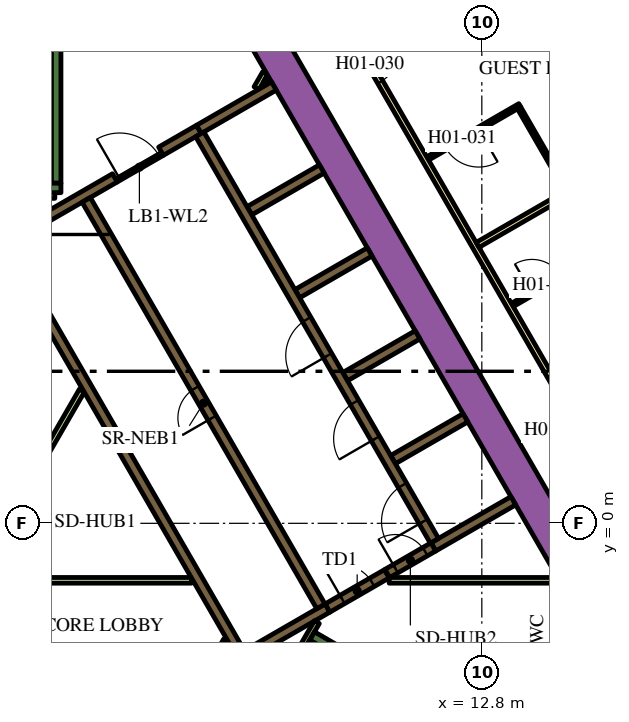
"""IFC4 building model, lengths in metres.
Left out: names, types, materials, properties, quantities, classifications, styles, units other than length and angle.
Written with IfcOpenShell. Run it as: python <this file> out.ifc"""

import sys

from ifc_helpers import new_model, si_unit, direction, frame, frame_2d, origin, place, context, subcontext, project, spatial, polyline, rectangle, outline, extrude, element, fill, save


model = new_model("IFC4")
c1 = context("Model", 3, precision=1e-05, world=origin(), true_north=direction((0.0, 1.0)))
c2 = subcontext(c1, "Body", "Model", "MODEL_VIEW")
j1 = project(units=[si_unit("LENGTHUNIT", "METRE"), si_unit("PLANEANGLEUNIT", "RADIAN")], contexts=[c1])
p1 = place(None, origin())
s1 = spatial("IfcSite", under=j1, at=p1, CompositionType="ELEMENT")
p2 = place(p1, origin())
s2 = spatial("IfcBuilding", under=s1, at=p2, CompositionType="ELEMENT")
p3 = place(p2, frame((0.0, 0.0, 27.6)))
s3 = spatial("IfcBuildingStorey", under=s2, at=p3, CompositionType="ELEMENT", Elevation=27.6)
p4 = place(p3, frame((6.776, 13.364, 0.0), z_axis=(0.0, 0.0, 1.0), x_axis=(0.500004177138, -0.8660229921, 0.0)))
e1 = element("IfcWall", 1, at=p4, inside=s3, PredefinedType="SOLIDWALL", context=c2, shape_type="SweptSolid", body=[
    extrude(rectangle(XDim=20.204, YDim=0.9, at=frame_2d((10.102, 0.0))), origin(), (0.0, 0.0, 1.0), 3.9),
])
p5 = place(p3, frame((8.334, -2.964, 0.0), z_axis=(0.0, 0.0, 1.0), x_axis=(0.866016039709, -0.500016218704, 0.0)))
e2 = element("IfcWall", 2, at=p5, inside=s3, PredefinedType="SOLIDWALL", context=c2, shape_type="SweptSolid", body=[
    extrude(rectangle(XDim=7.05, YDim=0.25, at=frame_2d((3.525, 0.0))), origin(), (0.0, 0.0, 1.0), 3.9),
])
p6 = place(p3, frame((8.168, -3.503, 0.0), z_axis=(0.0, 0.0, 1.0), x_axis=(0.49972245349, 0.866185586049, 0.0)))
e3 = element("IfcWall", 3, at=p6, inside=s3, PredefinedType="SOLIDWALL", context=c2, shape_type="SweptSolid", body=[
    extrude(rectangle(XDim=0.425, YDim=0.25, at=frame_2d((0.212, 0.0))), origin(), (0.0, 0.0, 1.0), 3.9),
])
p7 = place(p3, frame((1.6, 8.95, 0.0), z_axis=(0.0, 0.0, 1.0), x_axis=(0.0, 1.0, 0.0)))
e4 = element("IfcWall", 4, at=p7, inside=s3, PredefinedType="SOLIDWALL", context=c2, shape_type="SweptSolid", body=[
    extrude(rectangle(XDim=6.8, YDim=0.25, at=frame_2d((3.4, 0.0))), origin(), (0.0, 0.0, 1.0), 3.9),
])
p8 = place(p3, frame((1.05, 8.825, 0.0), z_axis=(0.0, 0.0, 1.0), x_axis=(1.0, 0.0, 0.0)))
e5 = element("IfcWall", 5, at=p8, inside=s3, PredefinedType="SOLIDWALL", context=c2, shape_type="SweptSolid", body=[
    extrude(rectangle(XDim=0.675, YDim=0.25, at=frame_2d((0.337, 0.0))), origin(), (0.0, 0.0, 1.0), 3.9),
])
p9 = place(p3, frame((10.464, 1.677, 0.0), z_axis=(0.0, 0.0, 1.0), x_axis=(0.86605622881, 0.499946605688, 0.0)))
e6 = element("IfcWall", 6, at=p9, inside=s3, PredefinedType="SOLIDWALL", context=c2, shape_type="SweptSolid", body=[
    extrude(rectangle(XDim=2.2, YDim=0.25, at=frame_2d((1.1, 0.0))), origin(), (0.0, 0.0, 1.0), 3.9),
])
p10 = place(p3, frame((13.629, 0.594, 0.0), z_axis=(0.0, 0.0, 1.0), x_axis=(-0.866063384774, -0.499934209226, 0.0)))
e7 = element("IfcWall", 7, at=p10, inside=s3, PredefinedType="SOLIDWALL", context=c2, shape_type="SweptSolid", body=[
    extrude(rectangle(XDim=2.428, YDim=0.25, at=frame_2d((1.214, 0.0))), origin(), (0.0, 0.0, 1.0), 3.9),
])
p11 = place(p3, origin())
e8 = element("IfcWall", 8, at=p11, inside=s3, PredefinedType="SOLIDWALL", context=c2, shape_type="SweptSolid", body=[
    extrude(outline(polyline([(0.566, 6.725), (0.566, 6.875), (0.566, 6.875), (0.565, 6.875), (0.361, 6.875), (0.035, 7.439), (0.252, 7.564), (0.377, 7.348), (6.552, -3.348), (6.677, -3.564), (6.46, -3.689), (0.448, 6.725), (0.565, 6.725), (0.566, 6.725), (0.566, 6.725)])), origin(), (0.0, 0.0, 1.0), 3.9),
])
p12 = place(p3, frame((4.358, 9.791, 0.0), z_axis=(0.0, 0.0, 1.0), x_axis=(0.866079547155, 0.499906209203, 0.0)))
e9 = element("IfcWall", 9, at=p12, inside=s3, PredefinedType="SOLIDWALL", context=c2, shape_type="SweptSolid", body=[
    extrude(rectangle(XDim=1.15, YDim=0.25, at=frame_2d((0.575, 0.0))), origin(), (0.0, 0.0, 1.0), 3.9),
])
p13 = place(p3, frame((5.356, 10.367, 0.0), z_axis=(0.0, 0.0, 1.0), x_axis=(0.865978535641, 0.50008116922, 0.0)))
e10 = element("IfcWall", 10, at=p13, inside=s3, PredefinedType="SOLIDWALL", context=c2, shape_type="SweptSolid", body=[
    extrude(rectangle(XDim=2.278, YDim=0.25, at=frame_2d((1.139, 0.0))), origin(), (0.0, 0.0, 1.0), 3.9),
])
p14 = place(p3, frame((0.314, 7.456, 0.0), z_axis=(0.0, 0.0, 1.0), x_axis=(0.866013897511, 0.50001992892, 0.0)))
e11 = element("IfcWall", 11, at=p14, inside=s3, PredefinedType="SOLIDWALL", context=c2, shape_type="SweptSolid", body=[
    extrude(rectangle(XDim=3.268, YDim=0.25, at=frame_2d((1.634, 0.0))), origin(), (0.0, 0.0, 1.0), 3.9),
])
p15 = place(p3, frame((6.614, -3.456, 0.0), z_axis=(0.0, 0.0, 1.0), x_axis=(0.866031582473, 0.499989298045, 0.0)))
e12 = element("IfcWall", 12, at=p15, inside=s3, PredefinedType="SOLIDWALL", context=c2, shape_type="SweptSolid", body=[
    extrude(rectangle(XDim=2.455, YDim=0.25, at=frame_2d((1.228, 0.0))), origin(), (0.0, 0.0, 1.0), 3.9),
])
for number, where, z_axis, x_axis in (
    (13, (6.684, 8.224, 0.0), (0.0, 0.0, 1.0), (0.866, 0.5, 0.0)),
    (14, (7.944, 6.041, 0.0), (0.0, 0.0, 1.0), (0.866, 0.5, 0.0)),
    (15, (9.204, 3.859, 0.0), (0.0, 0.0, 1.0), (0.866, 0.5, 0.0)),
):
    element("IfcWall", number, at=place(p3, frame(where, z_axis=z_axis, x_axis=x_axis)), inside=s3, PredefinedType="SOLIDWALL", context=c2, shape_type="SweptSolid", body=[
        extrude(rectangle(XDim=2.2, YDim=0.25, at=frame_2d((1.1, 0.0))), origin(), (0.0, 0.0, 1.0), 3.9),
    ])
p16 = place(p3, frame((5.705, -3.718, 0.0), z_axis=(0.0, 0.0, 1.0), x_axis=(0.499962090823, 0.866047289552, 0.0)))
e16 = element("IfcWall", 16, at=p16, inside=s3, PredefinedType="PARTITIONING", context=c2, shape_type="SweptSolid", body=[
    extrude(rectangle(XDim=0.735, YDim=0.15, at=frame_2d((0.367, 0.0))), origin(), (0.0, 0.0, 1.0), 2.75),
])
p17 = place(p3, frame((8.459, -2.599, 0.0), z_axis=(0.0, 0.0, 1.0), x_axis=(-0.500041054325, -0.866001699761, 0.0)))
e17 = element("IfcWall", 17, at=p17, inside=s3, PredefinedType="PARTITIONING", context=c2, shape_type="SweptSolid", body=[
    extrude(rectangle(XDim=0.929, YDim=0.15, at=frame_2d((0.464, 0.0))), origin(), (0.0, 0.0, 1.0), 3.9),
])
p18 = place(p3, frame((10.362, -1.5, 0.0), z_axis=(0.0, 0.0, 1.0), x_axis=(1.0, 0.0, 0.0)))
e18 = element("IfcWall", 18, at=p18, inside=s3, PredefinedType="PARTITIONING", context=c2, shape_type="SweptSolid", body=[
    extrude(rectangle(XDim=4.439, YDim=0.15, at=frame_2d((2.22, 0.0))), origin(), (0.0, 0.0, 1.0), 2.75),
])
p19 = place(p3, frame((-4.2, -1.5, 0.0), z_axis=(0.0, 0.0, 1.0), x_axis=(1.0, 0.0, 0.0)))
e19 = element("IfcWall", 19, at=p19, inside=s3, PredefinedType="PARTITIONING", context=c2, shape_type="SweptSolid", body=[
    extrude(rectangle(XDim=9.359, YDim=0.15, at=frame_2d((4.68, 0.0))), origin(), (0.0, 0.0, 1.0), 2.75),
])
p20 = place(p3, frame((1.312, 1.822, 0.0), z_axis=(0.0, 0.0, 1.0), x_axis=(0.500003549559, 0.866023354436, 0.0)))
e20 = element("IfcWall", 20, at=p20, inside=s3, PredefinedType="PARTITIONING", context=c2, shape_type="SweptSolid", body=[
    extrude(rectangle(XDim=1.93, YDim=0.15, at=frame_2d((0.965, 0.0))), origin(), (0.0, 0.0, 1.0), 2.75),
])
p21 = place(p3, frame((1.05, 8.625, 0.0), z_axis=(0.0, 0.0, 1.0), x_axis=(1.0, 0.0, 0.0)))
e21 = element("IfcWall", 21, at=p21, inside=s3, PredefinedType="PARTITIONING", context=c2, shape_type="SweptSolid", body=[
    extrude(rectangle(XDim=0.514, YDim=0.15, at=frame_2d((0.257, 0.0))), origin(), (0.0, 0.0, 1.0), 2.75),
])
p22 = place(p3, frame((6.872, 11.45, 0.0), z_axis=(0.0, 0.0, 1.0), x_axis=(0.499846793097, 0.866113839764, 0.0)))
e22 = element("IfcWall", 22, at=p22, inside=s3, PredefinedType="PARTITIONING", context=c2, shape_type="SweptSolid", body=[
    extrude(rectangle(XDim=0.453, YDim=0.15, at=frame_2d((0.227, 0.0))), origin(), (0.0, 0.0, 1.0), 2.75),
])
p23 = place(p3, frame((7.131, 11.6, 0.0), z_axis=(0.0, 0.0, 1.0), x_axis=(0.498600033135, 0.866832167699, 0.0)))
e23 = element("IfcWall", 23, at=p23, inside=s3, PredefinedType="PARTITIONING", context=c2, shape_type="SweptSolid", body=[
    extrude(rectangle(XDim=0.107, YDim=0.15, at=frame_2d((0.053, 0.0))), origin(), (0.0, 0.0, 1.0), 2.75),
])
p24 = place(p3, frame((11.553, -0.46, 0.0), z_axis=(0.0, 0.0, 1.0), x_axis=(-0.500006514828, 0.866021642414, 0.0)))
e24 = element("IfcWall", 24, at=p24, inside=s3, PredefinedType="SOLIDWALL", context=c2, shape_type="SweptSolid", body=[
    extrude(rectangle(XDim=12.35, YDim=0.25, at=frame_2d((6.175, 0.0))), origin(), (0.0, 0.0, 1.0), 3.9),
])
p25 = place(p24, frame((0.585, 0.0, 0.0)))
e25 = element("IfcOpeningElement", 25, at=p25, cuts=e24, PredefinedType="OPENING", context=c2, shape_type="SweptSolid", body=[
    extrude(rectangle(XDim=1.1, YDim=2.1, at=frame_2d((0.55, 1.05))), frame((0.0, 0.135, 0.0), z_axis=(0.0, -1.0, 0.0), x_axis=(1.0, 0.0, 0.0)), (0.0, 0.0, 1.0), 0.27),
])
p26 = place(p24, frame((3.105, 0.0, 0.0)))
e26 = element("IfcOpeningElement", 26, at=p26, cuts=e24, PredefinedType="OPENING", context=c2, shape_type="SweptSolid", body=[
    extrude(rectangle(XDim=1.1, YDim=2.1, at=frame_2d((0.55, 1.05))), frame((0.0, 0.135, 0.0), z_axis=(0.0, -1.0, 0.0), x_axis=(1.0, 0.0, 0.0)), (0.0, 0.0, 1.0), 0.27),
])
p27 = place(p24, frame((5.625, 0.0, 0.0)))
e27 = element("IfcOpeningElement", 27, at=p27, cuts=e24, PredefinedType="OPENING", context=c2, shape_type="SweptSolid", body=[
    extrude(rectangle(XDim=1.1, YDim=2.1, at=frame_2d((0.55, 1.05))), frame((0.0, 0.135, 0.0), z_axis=(0.0, -1.0, 0.0), x_axis=(1.0, 0.0, 0.0)), (0.0, 0.0, 1.0), 0.27),
])
p28 = place(p3, frame((8.565, -2.185, 0.0), z_axis=(0.0, 0.0, 1.0), x_axis=(-0.499997954832, 0.866026584559, 0.0)))
e28 = element("IfcWall", 28, at=p28, inside=s3, PredefinedType="SOLIDWALL", context=c2, shape_type="SweptSolid", body=[
    extrude(rectangle(XDim=12.35, YDim=0.25, at=frame_2d((6.175, 0.0))), origin(), (0.0, 0.0, 1.0), 3.9),
])
p29 = place(p28, frame((5.725, 0.0, 0.0)))
e29 = element("IfcOpeningElement", 29, at=p29, cuts=e28, PredefinedType="OPENING", context=c2, shape_type="SweptSolid", body=[
    extrude(rectangle(XDim=0.9, YDim=2.1, at=frame_2d((0.45, 1.05))), frame((0.0, 0.135, 0.0), z_axis=(0.0, -1.0, 0.0), x_axis=(1.0, 0.0, 0.0)), (0.0, 0.0, 1.0), 0.27),
])
p30 = place(p3, frame((8.74, -2.229, 0.0), z_axis=(0.0, 0.0, 1.0), x_axis=(0.865989075817, 0.500062916607, 0.0)))
e30 = element("IfcWall", 30, at=p30, inside=s3, PredefinedType="SOLIDWALL", context=c2, shape_type="SweptSolid", body=[
    extrude(rectangle(XDim=1.8, YDim=0.25, at=frame_2d((0.9, 0.0))), origin(), (0.0, 0.0, 1.0), 3.9),
])
p31 = place(p30, frame((0.45, 0.0, 0.0)))
e31 = element("IfcOpeningElement", 31, at=p31, cuts=e30, PredefinedType="OPENING", context=c2, shape_type="SweptSolid", body=[
    extrude(rectangle(XDim=0.9, YDim=2.1, at=frame_2d((0.45, 1.05))), frame((0.0, 0.135, 0.0), z_axis=(0.0, -1.0, 0.0), x_axis=(1.0, 0.0, 0.0)), (0.0, 0.0, 1.0), 0.27),
])
p32 = place(p3, frame((3.183, 9.02, 0.0), z_axis=(0.0, 0.0, 1.0), x_axis=(0.866034573852, 0.49998411664, 0.0)))
e32 = element("IfcWall", 32, at=p32, inside=s3, PredefinedType="PARTITIONING", context=c2, shape_type="SweptSolid", body=[
    extrude(rectangle(XDim=1.4, YDim=0.09, at=frame_2d((0.7, 0.0))), origin(), (0.0, 0.0, 1.0), 2.75),
])
p33 = place(p32, frame((0.1, 0.0, 0.0)))
e33 = element("IfcOpeningElement", 33, at=p33, cuts=e32, PredefinedType="OPENING", context=c2, shape_type="SweptSolid", body=[
    extrude(rectangle(XDim=1.2, YDim=2.1, at=frame_2d((0.6, 1.05))), frame((0.0, 0.055, 0.0), z_axis=(0.0, -1.0, 0.0), x_axis=(1.0, 0.0, 0.0)), (0.0, 0.0, 1.0), 0.11),
])
p34 = place(p3, frame((10.313, -1.32, 0.0), z_axis=(0.0, 0.0, 1.0), x_axis=(0.866034573852, 0.49998411664, 0.0)))
e34 = element("IfcWall", 34, at=p34, inside=s3, PredefinedType="SOLIDWALL", context=c2, shape_type="SweptSolid", body=[
    extrude(rectangle(XDim=1.4, YDim=0.25, at=frame_2d((0.7, 0.0))), origin(), (0.0, 0.0, 1.0), 3.9),
])
p35 = place(p34, frame((0.25, 0.0, 0.0)))
e35 = element("IfcOpeningElement", 35, at=p35, cuts=e34, PredefinedType="OPENING", context=c2, shape_type="SweptSolid", body=[
    extrude(rectangle(XDim=0.9, YDim=2.1, at=frame_2d((0.45, 1.05))), frame((0.0, 0.135, 0.0), z_axis=(0.0, -1.0, 0.0), x_axis=(1.0, 0.0, 0.0)), (0.0, 0.0, 1.0), 0.27),
])
p36 = place(p3, frame((6.163, 18.475, 0.0), z_axis=(0.0, 0.0, 1.0), x_axis=(0.500001317485, -0.866024643133, 0.0)))
e36 = element("IfcWall", 36, at=p36, inside=s3, PredefinedType="PARTITIONING", context=c2, shape_type="SweptSolid", body=[
    extrude(rectangle(XDim=25.767, YDim=0.15, at=frame_2d((12.883, 0.0))), origin(), (0.0, 0.0, 1.0), 2.75),
])
p37 = place(p36, frame((24.586, 0.0, 0.0)))
e37 = element("IfcOpeningElement", 37, at=p37, cuts=e36, PredefinedType="OPENING", context=c2, shape_type="SweptSolid", body=[
    extrude(rectangle(XDim=1.0, YDim=2.1, at=frame_2d((0.5, 1.05))), frame((0.0, 0.085, 0.0), z_axis=(0.0, -1.0, 0.0), x_axis=(1.0, 0.0, 0.0)), (0.0, 0.0, 1.0), 0.17),
])
p38 = place(p36, frame((19.319, 0.0, 0.0)))
e38 = element("IfcOpeningElement", 38, at=p38, cuts=e36, PredefinedType="OPENING", context=c2, shape_type="SweptSolid", body=[
    extrude(rectangle(XDim=1.0, YDim=2.1, at=frame_2d((0.5, 1.05))), frame((0.0, 0.085, 0.0), z_axis=(0.0, -1.0, 0.0), x_axis=(1.0, 0.0, 0.0)), (0.0, 0.0, 1.0), 0.17),
])
p39 = place(p36, frame((18.012, 0.0, 0.0)))
e39 = element("IfcOpeningElement", 39, at=p39, cuts=e36, PredefinedType="OPENING", context=c2, shape_type="SweptSolid", body=[
    extrude(rectangle(XDim=1.0, YDim=2.1, at=frame_2d((0.5, 1.05))), frame((0.0, 0.085, 0.0), z_axis=(0.0, -1.0, 0.0), x_axis=(1.0, 0.0, 0.0)), (0.0, 0.0, 1.0), 0.17),
])
p40 = place(p36, frame((6.824, 0.0, 0.0)))
e40 = element("IfcOpeningElement", 40, at=p40, cuts=e36, PredefinedType="OPENING", context=c2, shape_type="SweptSolid", body=[
    extrude(rectangle(XDim=1.1, YDim=2.1, at=frame_2d((0.55, 1.05))), frame((0.0, 0.085, 0.0), z_axis=(0.0, -1.0, 0.0), x_axis=(1.0, 0.0, 0.0)), (0.0, 0.0, 1.0), 0.17),
])
p41 = place(p36, frame((4.658, 0.0, 0.0)))
e41 = element("IfcOpeningElement", 41, at=p41, cuts=e36, PredefinedType="OPENING", context=c2, shape_type="SweptSolid", body=[
    extrude(rectangle(XDim=0.9, YDim=2.1, at=frame_2d((0.45, 1.05))), frame((0.0, 0.085, 0.0), z_axis=(0.0, -1.0, 0.0), x_axis=(1.0, 0.0, 0.0)), (0.0, 0.0, 1.0), 0.17),
])
p42 = place(p36, frame((0.18, 0.0, 0.0)))
e42 = element("IfcOpeningElement", 42, at=p42, cuts=e36, PredefinedType="OPENING", context=c2, shape_type="SweptSolid", body=[
    extrude(rectangle(XDim=1.0, YDim=2.1, at=frame_2d((0.5, 1.05))), frame((0.0, 0.085, 0.0), z_axis=(0.0, -1.0, 0.0), x_axis=(1.0, 0.0, 0.0)), (0.0, 0.0, 1.0), 0.17),
])
p43 = place(p3, frame((19.982, 11.537, 0.0), z_axis=(0.0, 0.0, 1.0), x_axis=(-0.866020994654, -0.500007636761, 0.0)))
e43 = element("IfcWall", 43, at=p43, inside=s3, PredefinedType="PARTITIONING", context=c2, shape_type="SweptSolid", body=[
    extrude(rectangle(XDim=8.423, YDim=0.15, at=frame_2d((4.211, 0.0))), origin(), (0.0, 0.0, 1.0), 2.75),
])
p44 = place(p3, frame((13.6, 5.744, 0.0), z_axis=(0.0, 0.0, 1.0), x_axis=(0.866021400173, 0.500006934395, 0.0)))
e44 = element("IfcWall", 44, at=p44, inside=s3, PredefinedType="PARTITIONING", context=c2, shape_type="SweptSolid", body=[
    extrude(rectangle(XDim=2.6, YDim=0.1, at=frame_2d((1.3, 0.0))), origin(), (0.0, 0.0, 1.0), 2.75),
])
p45 = place(p44, frame((0.6, 0.0, 0.0)))
e45 = element("IfcOpeningElement", 45, at=p45, cuts=e44, PredefinedType="OPENING", context=c2, shape_type="SweptSolid", body=[
    extrude(rectangle(XDim=0.9, YDim=2.1, at=frame_2d((0.45, 1.05))), frame((0.0, 0.06, 0.0), z_axis=(0.0, -1.0, 0.0), x_axis=(1.0, 0.0, 0.0)), (0.0, 0.0, 1.0), 0.12),
])
p46 = place(p3, frame((13.799, 10.999, 0.0), z_axis=(0.0, 0.0, 1.0), x_axis=(-0.866034573852, -0.49998411664, 0.0)))
e46 = element("IfcWall", 46, at=p46, inside=s3, PredefinedType="PARTITIONING", context=c2, shape_type="SweptSolid", body=[
    extrude(rectangle(XDim=2.8, YDim=0.1, at=frame_2d((1.4, 0.0))), origin(), (0.0, 0.0, 1.0), 2.75),
])
p47 = place(p46, frame((1.25, 0.0, 0.0)))
e47 = element("IfcOpeningElement", 47, at=p47, cuts=e46, PredefinedType="OPENING", context=c2, shape_type="SweptSolid", body=[
    extrude(rectangle(XDim=1.0, YDim=2.1, at=frame_2d((0.5, 1.05))), frame((0.0, 0.06, 0.0), z_axis=(0.0, -1.0, 0.0), x_axis=(1.0, 0.0, 0.0)), (0.0, 0.0, 1.0), 0.12),
])
p48 = place(p3, frame((13.781, 10.931, 0.0), z_axis=(0.0, 0.0, 1.0), x_axis=(0.500004234368, -0.866022959057, 0.0)))
e48 = element("IfcWall", 48, at=p48, inside=s3, PredefinedType="PARTITIONING", context=c2, shape_type="SweptSolid", body=[
    extrude(rectangle(XDim=2.5, YDim=0.1, at=frame_2d((1.25, 0.0))), origin(), (0.0, 0.0, 1.0), 2.75),
])
p49 = place(p25, origin())
e49 = element("IfcDoor", 49, at=p49, inside=s3, OperationType="DOUBLE_DOOR_SLIDING", PredefinedType="DOOR", context=c2, shape_type="SweptSolid", body=[
    extrude(rectangle(XDim=1.1, YDim=2.1, at=frame_2d((0.55, 1.05))), frame((0.0, 0.025, 0.0), z_axis=(0.0, -1.0, 0.0), x_axis=(1.0, 0.0, 0.0)), (0.0, 0.0, 1.0), 0.05),
])
fill(e25, e49)
p50 = place(p26, origin())
e50 = element("IfcDoor", 50, at=p50, inside=s3, OperationType="DOUBLE_DOOR_SLIDING", PredefinedType="DOOR", context=c2, shape_type="SweptSolid", body=[
    extrude(rectangle(XDim=1.1, YDim=2.1, at=frame_2d((0.55, 1.05))), frame((0.0, 0.025, 0.0), z_axis=(0.0, -1.0, 0.0), x_axis=(1.0, 0.0, 0.0)), (0.0, 0.0, 1.0), 0.05),
])
fill(e26, e50)
p51 = place(p27, origin())
e51 = element("IfcDoor", 51, at=p51, inside=s3, OperationType="DOUBLE_DOOR_SLIDING", PredefinedType="DOOR", context=c2, shape_type="SweptSolid", body=[
    extrude(rectangle(XDim=1.1, YDim=2.1, at=frame_2d((0.55, 1.05))), frame((0.0, 0.025, 0.0), z_axis=(0.0, -1.0, 0.0), x_axis=(1.0, 0.0, 0.0)), (0.0, 0.0, 1.0), 0.05),
])
fill(e27, e51)
p52 = place(p29, origin())
e52 = element("IfcDoor", 52, at=p52, inside=s3, OperationType="SINGLE_SWING_LEFT", PredefinedType="DOOR", context=c2, shape_type="SweptSolid", body=[
    extrude(rectangle(XDim=0.9, YDim=2.1, at=frame_2d((0.45, 1.05))), frame((0.0, 0.025, 0.0), z_axis=(0.0, -1.0, 0.0), x_axis=(1.0, 0.0, 0.0)), (0.0, 0.0, 1.0), 0.05),
])
fill(e29, e52)
p53 = place(p31, origin())
e53 = element("IfcDoor", 53, at=p53, inside=s3, OperationType="SINGLE_SWING_LEFT", PredefinedType="DOOR", context=c2, shape_type="SweptSolid", body=[
    extrude(rectangle(XDim=0.9, YDim=2.1, at=frame_2d((0.45, 1.05))), frame((0.0, 0.025, 0.0), z_axis=(0.0, -1.0, 0.0), x_axis=(1.0, 0.0, 0.0)), (0.0, 0.0, 1.0), 0.05),
])
fill(e31, e53)
p54 = place(p33, origin())
e54 = element("IfcDoor", 54, at=p54, inside=s3, OperationType="SINGLE_SWING_LEFT", PredefinedType="DOOR", context=c2, shape_type="SweptSolid", body=[
    extrude(rectangle(XDim=1.2, YDim=2.1, at=frame_2d((0.6, 1.05))), frame((0.0, 0.025, 0.0), z_axis=(0.0, -1.0, 0.0), x_axis=(1.0, 0.0, 0.0)), (0.0, 0.0, 1.0), 0.05),
])
fill(e33, e54)
p55 = place(p35, origin())
e55 = element("IfcDoor", 55, at=p55, inside=s3, OperationType="SINGLE_SWING_LEFT", PredefinedType="DOOR", context=c2, shape_type="SweptSolid", body=[
    extrude(rectangle(XDim=0.9, YDim=2.1, at=frame_2d((0.45, 1.05))), frame((0.0, 0.025, 0.0), z_axis=(0.0, -1.0, 0.0), x_axis=(1.0, 0.0, 0.0)), (0.0, 0.0, 1.0), 0.05),
])
fill(e35, e55)
p56 = place(p45, origin())
e56 = element("IfcDoor", 56, at=p56, inside=s3, OperationType="SINGLE_SWING_RIGHT", PredefinedType="DOOR", context=c2, shape_type="SweptSolid", body=[
    extrude(rectangle(XDim=0.9, YDim=2.1, at=frame_2d((0.45, 1.05))), frame((0.0, 0.025, 0.0), z_axis=(0.0, -1.0, 0.0), x_axis=(1.0, 0.0, 0.0)), (0.0, 0.0, 1.0), 0.05),
])
fill(e45, e56)
p57 = place(p40, origin())
e57 = element("IfcDoor", 57, at=p57, inside=s3, OperationType="SINGLE_SWING_LEFT", PredefinedType="DOOR", context=c2, shape_type="SweptSolid", body=[
    extrude(rectangle(XDim=1.1, YDim=2.1, at=frame_2d((0.55, 1.05))), frame((0.0, 0.025, 0.0), z_axis=(0.0, -1.0, 0.0), x_axis=(1.0, 0.0, 0.0)), (0.0, 0.0, 1.0), 0.05),
])
fill(e40, e57)
p58 = place(p47, origin())
e58 = element("IfcDoor", 58, at=p58, inside=s3, OperationType="SINGLE_SWING_LEFT", PredefinedType="DOOR", context=c2, shape_type="SweptSolid", body=[
    extrude(rectangle(XDim=1.0, YDim=2.1, at=frame_2d((0.5, 1.05))), frame((0.0, 0.025, 0.0), z_axis=(0.0, -1.0, 0.0), x_axis=(1.0, 0.0, 0.0)), (0.0, 0.0, 1.0), 0.05),
])
fill(e47, e58)
save(model, sys.argv[1])
